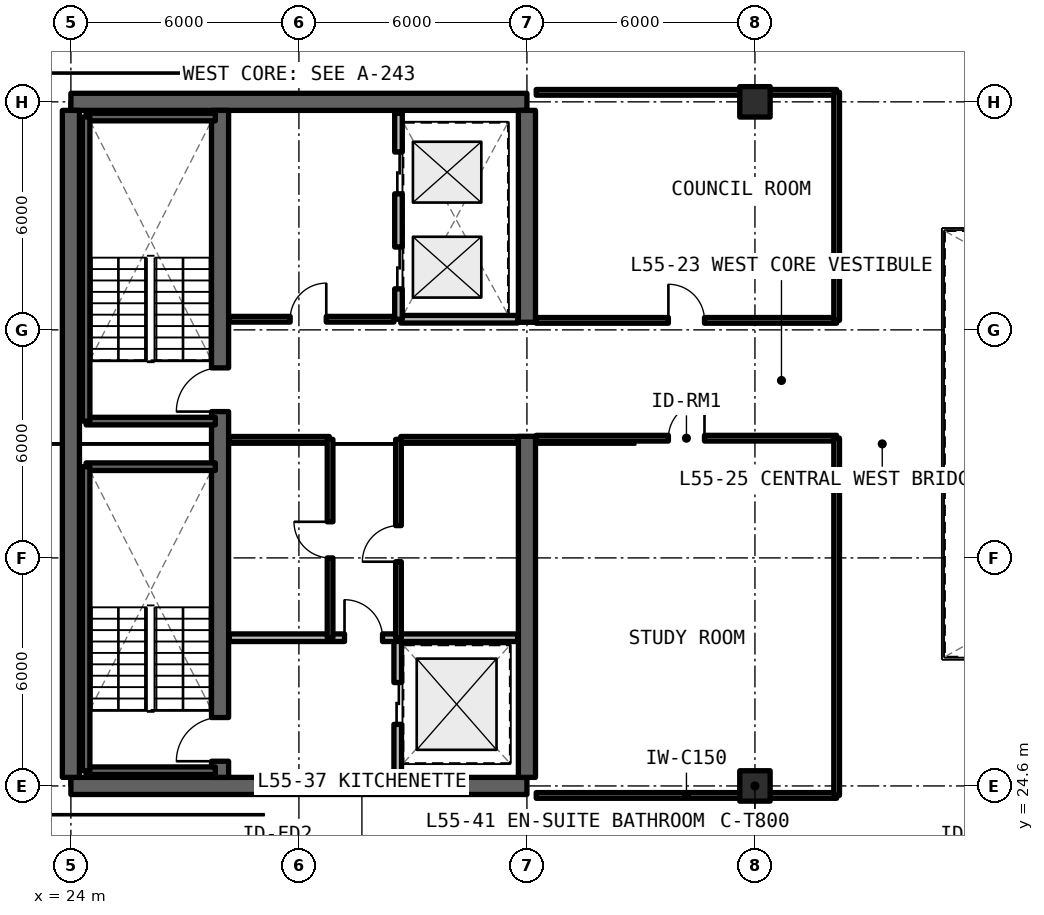
"""IFC4 building model, lengths in metres.
Left out: names, types, materials, properties, quantities, classifications, styles, units other than length and angle.
Written with IfcOpenShell. Run it as: python <this file> out.ifc"""

import sys

from ifc_helpers import new_model, si_unit, direction, frame, frame_2d, origin, origin_2d, place, context, subcontext, project, spatial, rectangle, extrude, element, fill, save


model = new_model("IFC4")
c1 = context("Model", 3, precision=1e-05, world=origin(), true_north=direction((0.0, 1.0)))
c2 = subcontext(c1, "Body", "Model", "MODEL_VIEW")
j1 = project(units=[si_unit("LENGTHUNIT", "METRE"), si_unit("PLANEANGLEUNIT", "RADIAN")], contexts=[c1])
p1 = place(None, origin())
s1 = spatial("IfcSite", under=j1, at=p1, CompositionType="ELEMENT")
p2 = place(p1, origin())
s2 = spatial("IfcBuilding", under=s1, at=p2, CompositionType="ELEMENT")
p3 = place(p2, frame((0.0, 0.0, 198.33)))
s3 = spatial("IfcBuildingStorey", under=s2, at=p3, CompositionType="ELEMENT", Elevation=198.33)
for number, where, z_axis, x_axis in (
    (1, (24.0, 24.6, 0.0), (0.0, 0.0, 1.0), (1.0, 0.0, 0.0)),
    (2, (36.0, 42.6, 0.0), (0.0, 0.0, 1.0), (-1.0, 0.0, 0.0)),
):
    element("IfcWall", number, at=place(p3, frame(where, z_axis=z_axis, x_axis=x_axis)), inside=s3, PredefinedType="SHEAR", context=c2, shape_type="SweptSolid", body=[
        extrude(rectangle(XDim=12.0, YDim=0.45, at=frame_2d((6.0, 0.0))), origin(), (0.0, 0.0, 1.0), 3.3),
    ])
p4 = place(p3, frame((24.0, 24.825, 0.0), z_axis=(0.0, 0.0, 1.0), x_axis=(0.0, 1.0, 0.0)))
e3 = element("IfcWall", 3, at=p4, inside=s3, PredefinedType="SHEAR", context=c2, shape_type="SweptSolid", body=[
    extrude(rectangle(XDim=17.55, YDim=0.45, at=frame_2d((8.775, 0.0))), origin(), (0.0, 0.0, 1.0), 3.3),
])
p5 = place(p3, frame((36.0, 24.825, 0.0), z_axis=(0.0, 0.0, 1.0), x_axis=(0.0, 1.0, 0.0)))
e4 = element("IfcWall", 4, at=p5, inside=s3, PredefinedType="SHEAR", context=c2, shape_type="SweptSolid", body=[
    extrude(rectangle(XDim=8.975, YDim=0.45, at=frame_2d((4.488, 0.0))), origin(), (0.0, 0.0, 1.0), 3.3),
])
p6 = place(p3, frame((36.0, 36.8, 0.0), z_axis=(0.0, 0.0, 1.0), x_axis=(0.0, 1.0, 0.0)))
e5 = element("IfcWall", 5, at=p6, inside=s3, PredefinedType="SHEAR", context=c2, shape_type="SweptSolid", body=[
    extrude(rectangle(XDim=5.575, YDim=0.45, at=frame_2d((2.788, 0.0))), origin(), (0.0, 0.0, 1.0), 3.3),
])
p7 = place(p3, frame((27.925, 24.825, 0.0), z_axis=(0.0, 0.0, 1.0), x_axis=(0.0, 1.0, 0.0)))
e6 = element("IfcWall", 6, at=p7, inside=s3, PredefinedType="SHEAR", context=c2, shape_type="SweptSolid", body=[
    extrude(rectangle(XDim=17.55, YDim=0.45, at=frame_2d((8.775, 0.0))), origin(), (0.0, 0.0, 1.0), 3.3),
])
p8 = place(p7, frame((0.425, 0.0, 0.0)))
e7 = element("IfcOpeningElement", 7, at=p8, cuts=e6, PredefinedType="OPENING", context=c2, shape_type="SweptSolid", body=[
    extrude(rectangle(XDim=1.15, YDim=2.15, at=frame_2d((0.575, 1.075))), frame((0.0, 0.235, 0.0), z_axis=(0.0, -1.0, 0.0), x_axis=(1.0, 0.0, 0.0)), (0.0, 0.0, 1.0), 0.47),
])
p9 = place(p7, frame((9.625, 0.0, 0.0)))
e8 = element("IfcOpeningElement", 8, at=p9, cuts=e6, PredefinedType="OPENING", context=c2, shape_type="SweptSolid", body=[
    extrude(rectangle(XDim=1.15, YDim=2.15, at=frame_2d((0.575, 1.075))), frame((0.0, 0.235, 0.0), z_axis=(0.0, -1.0, 0.0), x_axis=(1.0, 0.0, 0.0)), (0.0, 0.0, 1.0), 0.47),
])
for number, where, z_axis, x_axis in (
    (9, (42.0, 24.6, 0.0), (0.0, 0.0, 1.0), (1.0, 0.0, 0.0)),
    (10, (42.0, 42.6, 0.0), (0.0, 0.0, 1.0), (1.0, 0.0, 0.0)),
):
    element("IfcColumn", number, at=place(p3, frame(where, z_axis=z_axis, x_axis=x_axis)), inside=s3, PredefinedType="COLUMN", context=c2, shape_type="SweptSolid", body=[
        extrude(rectangle(XDim=0.8, YDim=0.8, at=origin_2d()), origin(), (0.0, 0.0, 1.0), 3.3),
    ])
p10 = place(p3, frame((32.6, 24.92, 0.0), z_axis=(0.0, 0.0, 1.0), x_axis=(0.0, 1.0, 0.0)))
e11 = element("IfcWall", 11, at=p10, inside=s3, PredefinedType="SOLIDWALL", context=c2, shape_type="SweptSolid", body=[
    extrude(rectangle(XDim=3.58, YDim=0.2, at=frame_2d((1.79, 0.0))), origin(), (0.0, 0.0, 1.0), 2.35),
])
p11 = place(p10, frame((1.3, 0.0, 0.0)))
e12 = element("IfcOpeningElement", 12, at=p11, cuts=e11, PredefinedType="OPENING", context=c2, shape_type="SweptSolid", body=[
    extrude(rectangle(XDim=1.1, YDim=2.2, at=frame_2d((0.55, 1.1))), frame((0.0, 0.11, 0.0), z_axis=(0.0, -1.0, 0.0), x_axis=(1.0, 0.0, 0.0)), (0.0, 0.0, 1.0), 0.22),
])
p12 = place(p3, frame((28.17, 28.5, 0.0), z_axis=(0.0, 0.0, 1.0), x_axis=(1.0, 0.0, 0.0)))
e13 = element("IfcWall", 13, at=p12, inside=s3, PredefinedType="SOLIDWALL", context=c2, shape_type="SweptSolid", body=[
    extrude(rectangle(XDim=7.585, YDim=0.2, at=frame_2d((3.792, 0.0))), origin(), (0.0, 0.0, 1.0), 2.35),
])
p13 = place(p12, frame((3.03, 0.0, 0.0)))
e14 = element("IfcOpeningElement", 14, at=p13, cuts=e13, PredefinedType="OPENING", context=c2, shape_type="SweptSolid", body=[
    extrude(rectangle(XDim=1.0, YDim=2.15, at=frame_2d((0.5, 1.075))), frame((0.0, 0.11, 0.0), z_axis=(0.0, -1.0, 0.0), x_axis=(1.0, 0.0, 0.0)), (0.0, 0.0, 1.0), 0.22),
])
p14 = place(p3, frame((28.17, 33.72, 0.0), z_axis=(0.0, 0.0, 1.0), x_axis=(1.0, 0.0, 0.0)))
e15 = element("IfcWall", 15, at=p14, inside=s3, PredefinedType="SOLIDWALL", context=c2, shape_type="SweptSolid", body=[
    extrude(rectangle(XDim=2.63, YDim=0.15, at=frame_2d((1.315, 0.0))), origin(), (0.0, 0.0, 1.0), 2.35),
])
p15 = place(p3, frame((30.82, 28.5, 0.0), z_axis=(0.0, 0.0, 1.0), x_axis=(0.0, 1.0, 0.0)))
e16 = element("IfcWall", 16, at=p15, inside=s3, PredefinedType="SOLIDWALL", context=c2, shape_type="SweptSolid", body=[
    extrude(rectangle(XDim=5.22, YDim=0.15, at=frame_2d((2.61, 0.0))), origin(), (0.0, 0.0, 1.0), 2.35),
])
p16 = place(p15, frame((2.1, 0.0, 0.0)))
e17 = element("IfcOpeningElement", 17, at=p16, cuts=e16, PredefinedType="OPENING", context=c2, shape_type="SweptSolid", body=[
    extrude(rectangle(XDim=0.95, YDim=2.15, at=frame_2d((0.475, 1.075))), frame((0.0, 0.085, 0.0), z_axis=(0.0, -1.0, 0.0), x_axis=(1.0, 0.0, 0.0)), (0.0, 0.0, 1.0), 0.17),
])
p17 = place(p3, frame((32.68, 33.72, 0.0), z_axis=(0.0, 0.0, 1.0), x_axis=(1.0, 0.0, 0.0)))
e18 = element("IfcWall", 18, at=p17, inside=s3, PredefinedType="SOLIDWALL", context=c2, shape_type="SweptSolid", body=[
    extrude(rectangle(XDim=3.075, YDim=0.15, at=frame_2d((1.538, 0.0))), origin(), (0.0, 0.0, 1.0), 2.35),
])
p18 = place(p3, frame((32.62, 28.5, 0.0), z_axis=(0.0, 0.0, 1.0), x_axis=(0.0, 1.0, 0.0)))
e19 = element("IfcWall", 19, at=p18, inside=s3, PredefinedType="SOLIDWALL", context=c2, shape_type="SweptSolid", body=[
    extrude(rectangle(XDim=5.22, YDim=0.15, at=frame_2d((2.61, 0.0))), origin(), (0.0, 0.0, 1.0), 2.35),
])
p19 = place(p18, frame((2.0, 0.0, 0.0)))
e20 = element("IfcOpeningElement", 20, at=p19, cuts=e19, PredefinedType="OPENING", context=c2, shape_type="SweptSolid", body=[
    extrude(rectangle(XDim=0.95, YDim=2.15, at=frame_2d((0.475, 1.075))), frame((0.0, 0.085, 0.0), z_axis=(0.0, -1.0, 0.0), x_axis=(1.0, 0.0, 0.0)), (0.0, 0.0, 1.0), 0.17),
])
p20 = place(p3, frame((28.17, 36.88, 0.0), z_axis=(0.0, 0.0, 1.0), x_axis=(1.0, 0.0, 0.0)))
e21 = element("IfcWall", 21, at=p20, inside=s3, PredefinedType="SOLIDWALL", context=c2, shape_type="SweptSolid", body=[
    extrude(rectangle(XDim=4.33, YDim=0.15, at=frame_2d((2.165, 0.0))), origin(), (0.0, 0.0, 1.0), 2.35),
])
p21 = place(p20, frame((1.6, 0.0, 0.0)))
e22 = element("IfcOpeningElement", 22, at=p21, cuts=e21, PredefinedType="OPENING", context=c2, shape_type="SweptSolid", body=[
    extrude(rectangle(XDim=0.95, YDim=2.15, at=frame_2d((0.475, 1.075))), frame((0.0, 0.085, 0.0), z_axis=(0.0, -1.0, 0.0), x_axis=(1.0, 0.0, 0.0)), (0.0, 0.0, 1.0), 0.17),
])
p22 = place(p3, frame((32.68, 36.88, 0.0), z_axis=(0.0, 0.0, 1.0), x_axis=(1.0, 0.0, 0.0)))
e23 = element("IfcWall", 23, at=p22, inside=s3, PredefinedType="SOLIDWALL", context=c2, shape_type="SweptSolid", body=[
    extrude(rectangle(XDim=3.075, YDim=0.2, at=frame_2d((1.538, 0.0))), origin(), (0.0, 0.0, 1.0), 2.35),
])
p23 = place(p3, frame((32.62, 36.88, 0.0), z_axis=(0.0, 0.0, 1.0), x_axis=(0.0, 1.0, 0.0)))
e24 = element("IfcWall", 24, at=p23, inside=s3, PredefinedType="SOLIDWALL", context=c2, shape_type="SweptSolid", body=[
    extrude(rectangle(XDim=5.42, YDim=0.2, at=frame_2d((2.71, 0.0))), origin(), (0.0, 0.0, 1.0), 2.35),
])
p24 = place(p23, frame((0.8, 0.0, 0.0)))
e25 = element("IfcOpeningElement", 25, at=p24, cuts=e24, PredefinedType="OPENING", context=c2, shape_type="SweptSolid", body=[
    extrude(rectangle(XDim=1.1, YDim=2.2, at=frame_2d((0.55, 1.1))), frame((0.0, 0.11, 0.0), z_axis=(0.0, -1.0, 0.0), x_axis=(1.0, 0.0, 0.0)), (0.0, 0.0, 1.0), 0.22),
])
p25 = place(p23, frame((3.3, 0.0, 0.0)))
e26 = element("IfcOpeningElement", 26, at=p25, cuts=e24, PredefinedType="OPENING", context=c2, shape_type="SweptSolid", body=[
    extrude(rectangle(XDim=1.1, YDim=2.2, at=frame_2d((0.55, 1.1))), frame((0.0, 0.11, 0.0), z_axis=(0.0, -1.0, 0.0), x_axis=(1.0, 0.0, 0.0)), (0.0, 0.0, 1.0), 0.22),
])
p26 = place(p3, frame((36.245, 24.35, 0.0), z_axis=(0.0, 0.0, 1.0), x_axis=(1.0, 0.0, 0.0)))
e27 = element("IfcWall", 27, at=p26, inside=s3, PredefinedType="SOLIDWALL", context=c2, shape_type="SweptSolid", body=[
    extrude(rectangle(XDim=7.905, YDim=0.15, at=frame_2d((3.952, 0.0))), origin(), (0.0, 0.0, 1.0), 2.35),
])
p27 = place(p3, frame((36.245, 33.75, 0.0), z_axis=(0.0, 0.0, 1.0), x_axis=(1.0, 0.0, 0.0)))
e28 = element("IfcWall", 28, at=p27, inside=s3, PredefinedType="SOLIDWALL", context=c2, shape_type="SweptSolid", body=[
    extrude(rectangle(XDim=7.905, YDim=0.15, at=frame_2d((3.952, 0.0))), origin(), (0.0, 0.0, 1.0), 2.35),
])
p28 = place(p27, frame((3.478, 0.0, 0.0)))
e29 = element("IfcOpeningElement", 29, at=p28, cuts=e28, PredefinedType="OPENING", context=c2, shape_type="SweptSolid", body=[
    extrude(rectangle(XDim=0.95, YDim=2.15, at=frame_2d((0.475, 1.075))), frame((0.0, 0.085, 0.0), z_axis=(0.0, -1.0, 0.0), x_axis=(1.0, 0.0, 0.0)), (0.0, 0.0, 1.0), 0.17),
])
p29 = place(p3, frame((44.15, 24.35, 0.0), z_axis=(0.0, 0.0, 1.0), x_axis=(0.0, 1.0, 0.0)))
e30 = element("IfcWall", 30, at=p29, inside=s3, PredefinedType="SOLIDWALL", context=c2, shape_type="SweptSolid", body=[
    extrude(rectangle(XDim=9.4, YDim=0.15, at=frame_2d((4.7, 0.0))), origin(), (0.0, 0.0, 1.0), 2.35),
])
p30 = place(p3, frame((36.245, 36.85, 0.0), z_axis=(0.0, 0.0, 1.0), x_axis=(1.0, 0.0, 0.0)))
e31 = element("IfcWall", 31, at=p30, inside=s3, PredefinedType="SOLIDWALL", context=c2, shape_type="SweptSolid", body=[
    extrude(rectangle(XDim=7.905, YDim=0.15, at=frame_2d((3.952, 0.0))), origin(), (0.0, 0.0, 1.0), 2.35),
])
p31 = place(p30, frame((3.478, 0.0, 0.0)))
e32 = element("IfcOpeningElement", 32, at=p31, cuts=e31, PredefinedType="OPENING", context=c2, shape_type="SweptSolid", body=[
    extrude(rectangle(XDim=0.95, YDim=2.15, at=frame_2d((0.475, 1.075))), frame((0.0, 0.085, 0.0), z_axis=(0.0, -1.0, 0.0), x_axis=(1.0, 0.0, 0.0)), (0.0, 0.0, 1.0), 0.17),
])
p32 = place(p3, frame((36.245, 42.85, 0.0), z_axis=(0.0, 0.0, 1.0), x_axis=(1.0, 0.0, 0.0)))
e33 = element("IfcWall", 33, at=p32, inside=s3, PredefinedType="SOLIDWALL", context=c2, shape_type="SweptSolid", body=[
    extrude(rectangle(XDim=7.905, YDim=0.15, at=frame_2d((3.952, 0.0))), origin(), (0.0, 0.0, 1.0), 2.35),
])
p33 = place(p3, frame((44.15, 36.85, 0.0), z_axis=(0.0, 0.0, 1.0), x_axis=(0.0, 1.0, 0.0)))
e34 = element("IfcWall", 34, at=p33, inside=s3, PredefinedType="SOLIDWALL", context=c2, shape_type="SweptSolid", body=[
    extrude(rectangle(XDim=6.0, YDim=0.15, at=frame_2d((3.0, 0.0))), origin(), (0.0, 0.0, 1.0), 2.35),
])
for number, where, z_axis, x_axis in (
    (35, (24.4, 25.0, 0.0), (0.0, 0.0, 1.0), (1.0, 0.0, 0.0)),
    (36, (27.8, 33.0, 0.0), (0.0, 0.0, 1.0), (-1.0, 0.0, 0.0)),
):
    element("IfcWall", number, at=place(p3, frame(where, z_axis=z_axis, x_axis=x_axis)), inside=s3, PredefinedType="SOLIDWALL", context=c2, shape_type="SweptSolid", body=[
        extrude(rectangle(XDim=3.4, YDim=0.2, at=frame_2d((1.7, 0.0))), origin(), (0.0, 0.0, 1.0), 3.3),
    ])
p34 = place(p3, frame((24.4, 33.0, 0.0), z_axis=(0.0, 0.0, 1.0), x_axis=(0.0, -1.0, 0.0)))
e37 = element("IfcWall", 37, at=p34, inside=s3, PredefinedType="SOLIDWALL", context=c2, shape_type="SweptSolid", body=[
    extrude(rectangle(XDim=8.0, YDim=0.2, at=frame_2d((4.0, 0.0))), origin(), (0.0, 0.0, 1.0), 3.3),
])
for number, where, z_axis, x_axis in (
    (38, (24.4, 34.2, 0.0), (0.0, 0.0, 1.0), (1.0, 0.0, 0.0)),
    (39, (27.8, 42.2, 0.0), (0.0, 0.0, 1.0), (-1.0, 0.0, 0.0)),
):
    element("IfcWall", number, at=place(p3, frame(where, z_axis=z_axis, x_axis=x_axis)), inside=s3, PredefinedType="SOLIDWALL", context=c2, shape_type="SweptSolid", body=[
        extrude(rectangle(XDim=3.4, YDim=0.2, at=frame_2d((1.7, 0.0))), origin(), (0.0, 0.0, 1.0), 3.3),
    ])
p35 = place(p3, frame((24.4, 42.2, 0.0), z_axis=(0.0, 0.0, 1.0), x_axis=(0.0, -1.0, 0.0)))
e40 = element("IfcWall", 40, at=p35, inside=s3, PredefinedType="SOLIDWALL", context=c2, shape_type="SweptSolid", body=[
    extrude(rectangle(XDim=8.0, YDim=0.2, at=frame_2d((4.0, 0.0))), origin(), (0.0, 0.0, 1.0), 3.3),
])
p36 = place(p11, origin())
e41 = element("IfcDoor", 41, at=p36, inside=s3, OperationType="SLIDING_TO_LEFT", PredefinedType="DOOR", context=c2, shape_type="SweptSolid", body=[
    extrude(rectangle(XDim=1.1, YDim=2.2, at=frame_2d((0.55, 1.1))), frame((0.0, 0.025, 0.0), z_axis=(0.0, -1.0, 0.0), x_axis=(1.0, 0.0, 0.0)), (0.0, 0.0, 1.0), 0.05),
])
fill(e12, e41)
p37 = place(p13, origin())
e42 = element("IfcDoor", 42, at=p37, inside=s3, OperationType="SINGLE_SWING_LEFT", PredefinedType="DOOR", context=c2, shape_type="SweptSolid", body=[
    extrude(rectangle(XDim=1.0, YDim=2.15, at=frame_2d((0.5, 1.075))), frame((0.0, 0.025, 0.0), z_axis=(0.0, -1.0, 0.0), x_axis=(1.0, 0.0, 0.0)), (0.0, 0.0, 1.0), 0.05),
])
fill(e14, e42)
p38 = place(p16, origin())
e43 = element("IfcDoor", 43, at=p38, inside=s3, OperationType="SINGLE_SWING_RIGHT", PredefinedType="DOOR", context=c2, shape_type="SweptSolid", body=[
    extrude(rectangle(XDim=0.95, YDim=2.15, at=frame_2d((0.475, 1.075))), frame((0.0, 0.025, 0.0), z_axis=(0.0, -1.0, 0.0), x_axis=(1.0, 0.0, 0.0)), (0.0, 0.0, 1.0), 0.05),
])
fill(e17, e43)
p39 = place(p19, origin())
e44 = element("IfcDoor", 44, at=p39, inside=s3, OperationType="SINGLE_SWING_LEFT", PredefinedType="DOOR", context=c2, shape_type="SweptSolid", body=[
    extrude(rectangle(XDim=0.95, YDim=2.15, at=frame_2d((0.475, 1.075))), frame((0.0, 0.025, 0.0), z_axis=(0.0, -1.0, 0.0), x_axis=(1.0, 0.0, 0.0)), (0.0, 0.0, 1.0), 0.05),
])
fill(e20, e44)
p40 = place(p21, origin())
e45 = element("IfcDoor", 45, at=p40, inside=s3, OperationType="SINGLE_SWING_RIGHT", PredefinedType="DOOR", context=c2, shape_type="SweptSolid", body=[
    extrude(rectangle(XDim=0.95, YDim=2.15, at=frame_2d((0.475, 1.075))), frame((0.0, 0.025, 0.0), z_axis=(0.0, -1.0, 0.0), x_axis=(1.0, 0.0, 0.0)), (0.0, 0.0, 1.0), 0.05),
])
fill(e22, e45)
p41 = place(p24, origin())
e46 = element("IfcDoor", 46, at=p41, inside=s3, OperationType="SLIDING_TO_LEFT", PredefinedType="DOOR", context=c2, shape_type="SweptSolid", body=[
    extrude(rectangle(XDim=1.1, YDim=2.2, at=frame_2d((0.55, 1.1))), frame((0.0, 0.025, 0.0), z_axis=(0.0, -1.0, 0.0), x_axis=(1.0, 0.0, 0.0)), (0.0, 0.0, 1.0), 0.05),
])
fill(e25, e46)
p42 = place(p25, origin())
e47 = element("IfcDoor", 47, at=p42, inside=s3, OperationType="SLIDING_TO_RIGHT", PredefinedType="DOOR", context=c2, shape_type="SweptSolid", body=[
    extrude(rectangle(XDim=1.1, YDim=2.2, at=frame_2d((0.55, 1.1))), frame((0.0, 0.025, 0.0), z_axis=(0.0, -1.0, 0.0), x_axis=(1.0, 0.0, 0.0)), (0.0, 0.0, 1.0), 0.05),
])
fill(e26, e47)
p43 = place(p28, origin())
e48 = element("IfcDoor", 48, at=p43, inside=s3, OperationType="SINGLE_SWING_RIGHT", PredefinedType="DOOR", context=c2, shape_type="SweptSolid", body=[
    extrude(rectangle(XDim=0.95, YDim=2.15, at=frame_2d((0.475, 1.075))), frame((0.0, 0.025, 0.0), z_axis=(0.0, -1.0, 0.0), x_axis=(1.0, 0.0, 0.0)), (0.0, 0.0, 1.0), 0.05),
])
fill(e29, e48)
p44 = place(p31, origin())
e49 = element("IfcDoor", 49, at=p44, inside=s3, OperationType="SINGLE_SWING_LEFT", PredefinedType="DOOR", context=c2, shape_type="SweptSolid", body=[
    extrude(rectangle(XDim=0.95, YDim=2.15, at=frame_2d((0.475, 1.075))), frame((0.0, 0.025, 0.0), z_axis=(0.0, -1.0, 0.0), x_axis=(1.0, 0.0, 0.0)), (0.0, 0.0, 1.0), 0.05),
])
fill(e32, e49)
p45 = place(p8, origin())
e50 = element("IfcDoor", 50, at=p45, inside=s3, OperationType="SINGLE_SWING_LEFT", PredefinedType="DOOR", context=c2, shape_type="SweptSolid", body=[
    extrude(rectangle(XDim=1.15, YDim=2.15, at=frame_2d((0.575, 1.075))), frame((0.0, 0.025, 0.0), z_axis=(0.0, -1.0, 0.0), x_axis=(1.0, 0.0, 0.0)), (0.0, 0.0, 1.0), 0.05),
])
fill(e7, e50)
p46 = place(p9, origin())
e51 = element("IfcDoor", 51, at=p46, inside=s3, OperationType="SINGLE_SWING_RIGHT", PredefinedType="DOOR", context=c2, shape_type="SweptSolid", body=[
    extrude(rectangle(XDim=1.15, YDim=2.15, at=frame_2d((0.575, 1.075))), frame((0.0, 0.025, 0.0), z_axis=(0.0, -1.0, 0.0), x_axis=(1.0, 0.0, 0.0)), (0.0, 0.0, 1.0), 0.05),
])
fill(e8, e51)
save(model, sys.argv[1])
